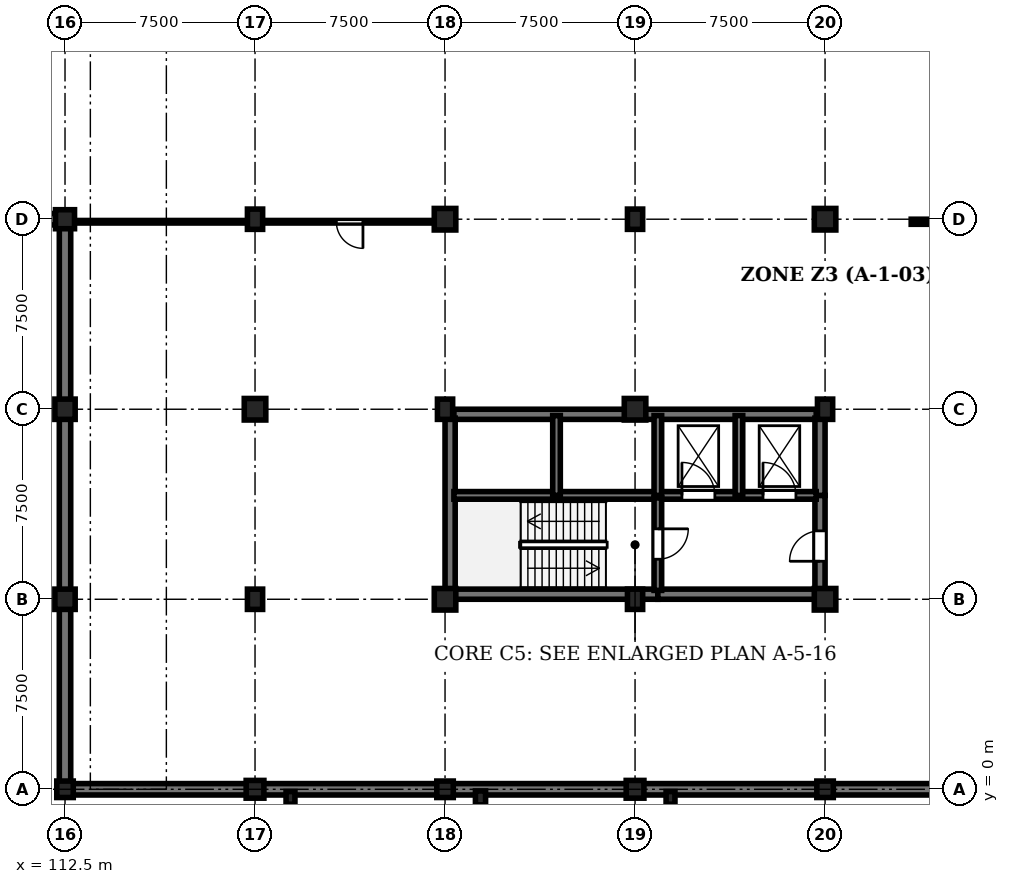
"""IFC4 building model, lengths in metres.
Left out: names, types, materials, properties, quantities, classifications, styles, units other than length and angle.
Written with IfcOpenShell. Run it as: python <this file> out.ifc"""

import sys

from ifc_helpers import new_model, si_unit, direction, frame, frame_2d, origin, origin_2d, place, context, subcontext, project, spatial, rectangle, circle, extrude, element, fill, save


model = new_model("IFC4")
c1 = context("Model", 3, precision=1e-05, world=origin(), true_north=direction((0.0, 1.0)))
c2 = subcontext(c1, "Body", "Model", "MODEL_VIEW")
j1 = project(units=[si_unit("LENGTHUNIT", "METRE"), si_unit("PLANEANGLEUNIT", "RADIAN")], contexts=[c1])
p1 = place(None, origin())
s1 = spatial("IfcSite", under=j1, at=p1, CompositionType="ELEMENT")
p2 = place(p1, origin())
s2 = spatial("IfcBuilding", under=s1, at=p2, CompositionType="ELEMENT")
p3 = place(p2, frame((0.0, 0.0, -4.5)))
s3 = spatial("IfcBuildingStorey", under=s2, at=p3, CompositionType="ELEMENT", Elevation=-4.5)
p4 = place(p3, frame((112.5, 0.0, 0.0), z_axis=(0.0, 0.0, 1.0), x_axis=(1.0, 0.0, 0.0)))
e1 = element("IfcColumn", 1, at=p4, inside=s3, PredefinedType="COLUMN", context=c2, shape_type="SweptSolid", body=[
    extrude(rectangle(XDim=0.65, YDim=0.65, at=origin_2d()), origin(), (0.0, 0.0, 1.0), 4.5),
])
for number, where, z_axis, x_axis in (
    (2, (112.5, 7.5, 0.0), (0.0, 0.0, 1.0), (1.0, 0.0, 0.0)),
    (3, (112.5, 15.0, 0.0), (0.0, 0.0, 1.0), (1.0, 0.0, 0.0)),
):
    element("IfcColumn", number, at=place(p3, frame(where, z_axis=z_axis, x_axis=x_axis)), inside=s3, PredefinedType="COLUMN", context=c2, shape_type="SweptSolid", body=[
        extrude(rectangle(XDim=0.8, YDim=0.8, at=origin_2d()), origin(), (0.0, 0.0, 1.0), 4.5),
    ])
p5 = place(p3, frame((112.5, 22.5, 0.0), z_axis=(0.0, 0.0, 1.0), x_axis=(1.0, 0.0, 0.0)))
e4 = element("IfcColumn", 4, at=p5, inside=s3, PredefinedType="COLUMN", context=c2, shape_type="SweptSolid", body=[
    extrude(circle(Radius=0.375, at=origin_2d()), origin(), (0.0, 0.0, 1.0), 4.5),
])
p6 = place(p3, frame((120.0, 0.0, 0.0), z_axis=(0.0, 0.0, 1.0), x_axis=(1.0, 0.0, 0.0)))
e5 = element("IfcColumn", 5, at=p6, inside=s3, PredefinedType="COLUMN", context=c2, shape_type="SweptSolid", body=[
    extrude(rectangle(XDim=0.7, YDim=0.7, at=origin_2d()), origin(), (0.0, 0.0, 1.0), 4.5),
])
p7 = place(p3, frame((120.0, 7.5, 0.0), z_axis=(0.0, 0.0, 1.0), x_axis=(1.0, 0.0, 0.0)))
e6 = element("IfcColumn", 6, at=p7, inside=s3, PredefinedType="COLUMN", context=c2, shape_type="SweptSolid", body=[
    extrude(rectangle(XDim=0.6, YDim=0.8, at=origin_2d()), origin(), (0.0, 0.0, 1.0), 4.5),
])
p8 = place(p3, frame((120.0, 15.0, 0.0), z_axis=(0.0, 0.0, 1.0), x_axis=(1.0, 0.0, 0.0)))
e7 = element("IfcColumn", 7, at=p8, inside=s3, PredefinedType="COLUMN", context=c2, shape_type="SweptSolid", body=[
    extrude(rectangle(XDim=0.85, YDim=0.85, at=origin_2d()), origin(), (0.0, 0.0, 1.0), 4.5),
])
p9 = place(p3, frame((120.0, 22.5, 0.0), z_axis=(0.0, 0.0, 1.0), x_axis=(1.0, 0.0, 0.0)))
e8 = element("IfcColumn", 8, at=p9, inside=s3, PredefinedType="COLUMN", context=c2, shape_type="SweptSolid", body=[
    extrude(rectangle(XDim=0.6, YDim=0.8, at=origin_2d()), origin(), (0.0, 0.0, 1.0), 4.5),
])
p10 = place(p3, frame((127.5, 0.0, 0.0), z_axis=(0.0, 0.0, 1.0), x_axis=(1.0, 0.0, 0.0)))
e9 = element("IfcColumn", 9, at=p10, inside=s3, PredefinedType="COLUMN", context=c2, shape_type="SweptSolid", body=[
    extrude(rectangle(XDim=0.65, YDim=0.65, at=origin_2d()), origin(), (0.0, 0.0, 1.0), 4.5),
])
p11 = place(p3, frame((127.5, 7.5, 0.0), z_axis=(0.0, 0.0, 1.0), x_axis=(1.0, 0.0, 0.0)))
e10 = element("IfcColumn", 10, at=p11, inside=s3, PredefinedType="COLUMN", context=c2, shape_type="SweptSolid", body=[
    extrude(rectangle(XDim=0.85, YDim=0.85, at=origin_2d()), origin(), (0.0, 0.0, 1.0), 4.5),
])
p12 = place(p3, frame((127.5, 15.0, 0.0), z_axis=(0.0, 0.0, 1.0), x_axis=(1.0, 0.0, 0.0)))
e11 = element("IfcColumn", 11, at=p12, inside=s3, PredefinedType="COLUMN", context=c2, shape_type="SweptSolid", body=[
    extrude(rectangle(XDim=0.6, YDim=0.8, at=origin_2d()), origin(), (0.0, 0.0, 1.0), 4.5),
])
p13 = place(p3, frame((127.5, 22.5, 0.0), z_axis=(0.0, 0.0, 1.0), x_axis=(1.0, 0.0, 0.0)))
e12 = element("IfcColumn", 12, at=p13, inside=s3, PredefinedType="COLUMN", context=c2, shape_type="SweptSolid", body=[
    extrude(rectangle(XDim=0.85, YDim=0.85, at=origin_2d()), origin(), (0.0, 0.0, 1.0), 4.5),
])
p14 = place(p3, frame((135.0, 0.0, 0.0), z_axis=(0.0, 0.0, 1.0), x_axis=(1.0, 0.0, 0.0)))
e13 = element("IfcColumn", 13, at=p14, inside=s3, PredefinedType="COLUMN", context=c2, shape_type="SweptSolid", body=[
    extrude(rectangle(XDim=0.7, YDim=0.7, at=origin_2d()), origin(), (0.0, 0.0, 1.0), 4.5),
])
p15 = place(p3, frame((135.0, 7.5, 0.0), z_axis=(0.0, 0.0, 1.0), x_axis=(1.0, 0.0, 0.0)))
e14 = element("IfcColumn", 14, at=p15, inside=s3, PredefinedType="COLUMN", context=c2, shape_type="SweptSolid", body=[
    extrude(rectangle(XDim=0.6, YDim=0.8, at=origin_2d()), origin(), (0.0, 0.0, 1.0), 4.5),
])
p16 = place(p3, frame((135.0, 15.0, 0.0), z_axis=(0.0, 0.0, 1.0), x_axis=(1.0, 0.0, 0.0)))
e15 = element("IfcColumn", 15, at=p16, inside=s3, PredefinedType="COLUMN", context=c2, shape_type="SweptSolid", body=[
    extrude(rectangle(XDim=0.85, YDim=0.85, at=origin_2d()), origin(), (0.0, 0.0, 1.0), 4.5),
])
p17 = place(p3, frame((135.0, 22.5, 0.0), z_axis=(0.0, 0.0, 1.0), x_axis=(1.0, 0.0, 0.0)))
e16 = element("IfcColumn", 16, at=p17, inside=s3, PredefinedType="COLUMN", context=c2, shape_type="SweptSolid", body=[
    extrude(rectangle(XDim=0.6, YDim=0.8, at=origin_2d()), origin(), (0.0, 0.0, 1.0), 4.5),
])
p18 = place(p3, frame((142.5, 0.0, 0.0), z_axis=(0.0, 0.0, 1.0), x_axis=(1.0, 0.0, 0.0)))
e17 = element("IfcColumn", 17, at=p18, inside=s3, PredefinedType="COLUMN", context=c2, shape_type="SweptSolid", body=[
    extrude(rectangle(XDim=0.65, YDim=0.65, at=origin_2d()), origin(), (0.0, 0.0, 1.0), 4.5),
])
p19 = place(p3, frame((142.5, 7.5, 0.0), z_axis=(0.0, 0.0, 1.0), x_axis=(1.0, 0.0, 0.0)))
e18 = element("IfcColumn", 18, at=p19, inside=s3, PredefinedType="COLUMN", context=c2, shape_type="SweptSolid", body=[
    extrude(rectangle(XDim=0.85, YDim=0.85, at=origin_2d()), origin(), (0.0, 0.0, 1.0), 4.5),
])
p20 = place(p3, frame((142.5, 15.0, 0.0), z_axis=(0.0, 0.0, 1.0), x_axis=(1.0, 0.0, 0.0)))
e19 = element("IfcColumn", 19, at=p20, inside=s3, PredefinedType="COLUMN", context=c2, shape_type="SweptSolid", body=[
    extrude(rectangle(XDim=0.6, YDim=0.8, at=origin_2d()), origin(), (0.0, 0.0, 1.0), 4.5),
])
p21 = place(p3, frame((142.5, 22.5, 0.0), z_axis=(0.0, 0.0, 1.0), x_axis=(1.0, 0.0, 0.0)))
e20 = element("IfcColumn", 20, at=p21, inside=s3, PredefinedType="COLUMN", context=c2, shape_type="SweptSolid", body=[
    extrude(rectangle(XDim=0.85, YDim=0.85, at=origin_2d()), origin(), (0.0, 0.0, 1.0), 4.5),
])
p22 = place(p3, frame((121.4, -0.34, 0.0), z_axis=(0.0, 0.0, 1.0), x_axis=(1.0, 0.0, 0.0)))
e21 = element("IfcColumn", 21, at=p22, inside=s3, PredefinedType="PILASTER", context=c2, shape_type="SweptSolid", body=[
    extrude(rectangle(XDim=0.35, YDim=0.5, at=origin_2d()), origin(), (0.0, 0.0, 1.0), 4.5),
])
p23 = place(p3, frame((128.9, -0.34, 0.0), z_axis=(0.0, 0.0, 1.0), x_axis=(1.0, 0.0, 0.0)))
e22 = element("IfcColumn", 22, at=p23, inside=s3, PredefinedType="PILASTER", context=c2, shape_type="SweptSolid", body=[
    extrude(rectangle(XDim=0.4, YDim=0.55, at=origin_2d()), origin(), (0.0, 0.0, 1.0), 4.5),
])
p24 = place(p3, frame((136.4, -0.34, 0.0), z_axis=(0.0, 0.0, 1.0), x_axis=(1.0, 0.0, 0.0)))
e23 = element("IfcColumn", 23, at=p24, inside=s3, PredefinedType="PILASTER", context=c2, shape_type="SweptSolid", body=[
    extrude(rectangle(XDim=0.35, YDim=0.5, at=origin_2d()), origin(), (0.0, 0.0, 1.0), 4.5),
])
for number, where, z_axis, x_axis in (
    (24, (150.0, 0.0, 0.0), (0.0, 0.0, 1.0), (-1.0, 0.0, 0.0)),
    (25, (142.5, 0.0, 0.0), (0.0, 0.0, 1.0), (-1.0, 0.0, 0.0)),
    (26, (135.0, 0.0, 0.0), (0.0, 0.0, 1.0), (-1.0, 0.0, 0.0)),
    (27, (127.5, 0.0, 0.0), (0.0, 0.0, 1.0), (-1.0, 0.0, 0.0)),
    (28, (120.0, 0.0, 0.0), (0.0, 0.0, 1.0), (-1.0, 0.0, 0.0)),
    (29, (112.5, 0.0, 0.0), (0.0, 0.0, 1.0), (0.0, 1.0, 0.0)),
    (30, (112.5, 7.5, 0.0), (0.0, 0.0, 1.0), (0.0, 1.0, 0.0)),
    (31, (112.5, 15.0, 0.0), (0.0, 0.0, 1.0), (0.0, 1.0, 0.0)),
    (32, (112.5, 22.5, 0.0), (0.0, 0.0, 1.0), (-1.0, 0.0, 0.0)),
):
    element("IfcWall", number, at=place(p3, frame(where, z_axis=z_axis, x_axis=x_axis)), inside=s3, PredefinedType="SOLIDWALL", context=c2, shape_type="SweptSolid", body=[
        extrude(rectangle(XDim=7.5, YDim=0.45, at=frame_2d((3.75, 0.0))), origin(), (0.0, 0.0, 1.0), 4.14),
    ])
p25 = place(p3, frame((127.85, 7.7, 0.0), z_axis=(0.0, 0.0, 1.0), x_axis=(1.0, 0.0, 0.0)))
e33 = element("IfcWall", 33, at=p25, inside=s3, PredefinedType="SHEAR", context=c2, shape_type="SweptSolid", body=[
    extrude(rectangle(XDim=8.05, YDim=0.4, at=frame_2d((4.025, 0.0))), origin(), (0.0, 0.0, 1.0), 4.14),
])
p26 = place(p3, frame((135.9, 7.7, 0.0), z_axis=(0.0, 0.0, 1.0), x_axis=(1.0, 0.0, 0.0)))
e34 = element("IfcWall", 34, at=p26, inside=s3, PredefinedType="SHEAR", context=c2, shape_type="SweptSolid", body=[
    extrude(rectangle(XDim=6.25, YDim=0.4, at=frame_2d((3.125, 0.0))), origin(), (0.0, 0.0, 1.0), 4.14),
])
p27 = place(p3, frame((127.85, 14.8, 0.0), z_axis=(0.0, 0.0, 1.0), x_axis=(1.0, 0.0, 0.0)))
e35 = element("IfcWall", 35, at=p27, inside=s3, PredefinedType="SHEAR", context=c2, shape_type="SweptSolid", body=[
    extrude(rectangle(XDim=14.3, YDim=0.4, at=frame_2d((7.15, 0.0))), origin(), (0.0, 0.0, 1.0), 4.14),
])
p28 = place(p3, frame((127.7, 7.85, 0.0), z_axis=(0.0, 0.0, 1.0), x_axis=(0.0, 1.0, 0.0)))
e36 = element("IfcWall", 36, at=p28, inside=s3, PredefinedType="SHEAR", context=c2, shape_type="SweptSolid", body=[
    extrude(rectangle(XDim=6.8, YDim=0.4, at=frame_2d((3.4, 0.0))), origin(), (0.0, 0.0, 1.0), 4.14),
])
p29 = place(p3, frame((142.3, 7.85, 0.0), z_axis=(0.0, 0.0, 1.0), x_axis=(0.0, 1.0, 0.0)))
e37 = element("IfcWall", 37, at=p29, inside=s3, PredefinedType="SHEAR", context=c2, shape_type="SweptSolid", body=[
    extrude(rectangle(XDim=3.75, YDim=0.4, at=frame_2d((1.875, 0.0))), origin(), (0.0, 0.0, 1.0), 4.14),
])
p30 = place(p29, frame((1.15, 0.0, 0.0)))
e38 = element("IfcOpeningElement", 38, at=p30, cuts=e37, PredefinedType="OPENING", context=c2, shape_type="SweptSolid", body=[
    extrude(rectangle(XDim=1.2, YDim=2.25, at=frame_2d((0.6, 1.125))), frame((0.0, 0.21, 0.0), z_axis=(0.0, -1.0, 0.0), x_axis=(1.0, 0.0, 0.0)), (0.0, 0.0, 1.0), 0.42),
])
p31 = place(p3, frame((142.3, 11.6, 0.0), z_axis=(0.0, 0.0, 1.0), x_axis=(0.0, 1.0, 0.0)))
e39 = element("IfcWall", 39, at=p31, inside=s3, PredefinedType="SHEAR", context=c2, shape_type="SweptSolid", body=[
    extrude(rectangle(XDim=3.05, YDim=0.4, at=frame_2d((1.525, 0.0))), origin(), (0.0, 0.0, 1.0), 4.14),
])
p32 = place(p3, frame((127.85, 11.6, 0.0), z_axis=(0.0, 0.0, 1.0), x_axis=(1.0, 0.0, 0.0)))
e40 = element("IfcWall", 40, at=p32, inside=s3, PredefinedType="SHEAR", context=c2, shape_type="SweptSolid", body=[
    extrude(rectangle(XDim=8.05, YDim=0.3, at=frame_2d((4.025, 0.0))), origin(), (0.0, 0.0, 1.0), 4.14),
])
p33 = place(p3, frame((135.9, 11.6, 0.0), z_axis=(0.0, 0.0, 1.0), x_axis=(1.0, 0.0, 0.0)))
e41 = element("IfcWall", 41, at=p33, inside=s3, PredefinedType="SHEAR", context=c2, shape_type="SweptSolid", body=[
    extrude(rectangle(XDim=6.25, YDim=0.3, at=frame_2d((3.125, 0.0))), origin(), (0.0, 0.0, 1.0), 4.14),
])
p34 = place(p33, frame((0.95, 0.0, 0.0)))
e42 = element("IfcOpeningElement", 42, at=p34, cuts=e41, PredefinedType="OPENING", context=c2, shape_type="SweptSolid", body=[
    extrude(rectangle(XDim=1.3, YDim=2.2, at=frame_2d((0.65, 1.1))), frame((0.0, 0.16, 0.0), z_axis=(0.0, -1.0, 0.0), x_axis=(1.0, 0.0, 0.0)), (0.0, 0.0, 1.0), 0.32),
])
p35 = place(p33, frame((4.15, 0.0, 0.0)))
e43 = element("IfcOpeningElement", 43, at=p35, cuts=e41, PredefinedType="OPENING", context=c2, shape_type="SweptSolid", body=[
    extrude(rectangle(XDim=1.3, YDim=2.2, at=frame_2d((0.65, 1.1))), frame((0.0, 0.16, 0.0), z_axis=(0.0, -1.0, 0.0), x_axis=(1.0, 0.0, 0.0)), (0.0, 0.0, 1.0), 0.32),
])
p36 = place(p3, frame((135.9, 11.5, 0.0), z_axis=(0.0, 0.0, 1.0), x_axis=(0.0, -1.0, 0.0)))
e44 = element("IfcWall", 44, at=p36, inside=s3, PredefinedType="SHEAR", context=c2, shape_type="SweptSolid", body=[
    extrude(rectangle(XDim=3.65, YDim=0.3, at=frame_2d((1.825, 0.0))), origin(), (0.0, 0.0, 1.0), 4.14),
])
p37 = place(p36, frame((1.22, 0.0, 0.0)))
e45 = element("IfcOpeningElement", 45, at=p37, cuts=e44, PredefinedType="OPENING", context=c2, shape_type="SweptSolid", body=[
    extrude(rectangle(XDim=1.2, YDim=2.25, at=frame_2d((0.6, 1.125))), frame((0.0, 0.16, 0.0), z_axis=(0.0, -1.0, 0.0), x_axis=(1.0, 0.0, 0.0)), (0.0, 0.0, 1.0), 0.32),
])
for number, where, z_axis, x_axis in (
    (46, (131.9, 11.6, 0.0), (0.0, 0.0, 1.0), (0.0, 1.0, 0.0)),
    (47, (135.9, 11.6, 0.0), (0.0, 0.0, 1.0), (0.0, 1.0, 0.0)),
    (48, (139.1, 11.6, 0.0), (0.0, 0.0, 1.0), (0.0, 1.0, 0.0)),
):
    element("IfcWall", number, at=place(p3, frame(where, z_axis=z_axis, x_axis=x_axis)), inside=s3, PredefinedType="SHEAR", context=c2, shape_type="SweptSolid", body=[
        extrude(rectangle(XDim=3.15, YDim=0.3, at=frame_2d((1.575, 0.0))), origin(), (0.0, 0.0, 1.0), 4.14),
    ])
p38 = place(p3, frame((127.0, 22.4, 0.0), z_axis=(0.0, 0.0, 1.0), x_axis=(-1.0, 0.0, 0.0)))
e49 = element("IfcWall", 49, at=p38, inside=s3, PredefinedType="PARTITIONING", context=c2, shape_type="SweptSolid", body=[
    extrude(rectangle(XDim=14.0, YDim=0.1, at=frame_2d((7.0, 0.0))), origin(), (0.0, 0.0, 1.0), 3.475),
])
p39 = place(p38, frame((2.74, 0.0, 0.0)))
e50 = element("IfcOpeningElement", 50, at=p39, cuts=e49, PredefinedType="OPENING", context=c2, shape_type="SweptSolid", body=[
    extrude(rectangle(XDim=1.05, YDim=2.2, at=frame_2d((0.525, 1.1))), frame((0.0, 0.06, 0.0), z_axis=(0.0, -1.0, 0.0), x_axis=(1.0, 0.0, 0.0)), (0.0, 0.0, 1.0), 0.12),
])
p40 = place(p3, frame((172.0, 22.4, 0.0), z_axis=(0.0, 0.0, 1.0), x_axis=(-1.0, 0.0, 0.0)))
e51 = element("IfcWall", 51, at=p40, inside=s3, PredefinedType="STANDARD", context=c2, shape_type="SweptSolid", body=[
    extrude(rectangle(XDim=26.1, YDim=0.2, at=frame_2d((13.05, 0.0))), origin(), (0.0, 0.0, 1.0), 3.475),
])
p41 = place(p40, frame((2.705, 0.0, 0.0)))
e52 = element("IfcOpeningElement", 52, at=p41, cuts=e51, PredefinedType="OPENING", context=c2, shape_type="SweptSolid", body=[
    extrude(rectangle(XDim=1.05, YDim=2.2, at=frame_2d((0.525, 1.1))), frame((0.0, 0.11, 0.0), z_axis=(0.0, -1.0, 0.0), x_axis=(1.0, 0.0, 0.0)), (0.0, 0.0, 1.0), 0.22),
])
p42 = place(p30, origin())
e53 = element("IfcDoor", 53, at=p42, inside=s3, OperationType="SINGLE_SWING_LEFT", PredefinedType="DOOR", context=c2, shape_type="SweptSolid", body=[
    extrude(rectangle(XDim=1.2, YDim=2.25, at=frame_2d((0.6, 1.125))), frame((0.0, 0.025, 0.0), z_axis=(0.0, -1.0, 0.0), x_axis=(1.0, 0.0, 0.0)), (0.0, 0.0, 1.0), 0.05),
])
fill(e38, e53)
p43 = place(p34, origin())
e54 = element("IfcDoor", 54, at=p43, inside=s3, OperationType="DOUBLE_DOOR_SLIDING", PredefinedType="DOOR", context=c2, shape_type="SweptSolid", body=[
    extrude(rectangle(XDim=1.3, YDim=2.2, at=frame_2d((0.65, 1.1))), frame((0.0, 0.025, 0.0), z_axis=(0.0, -1.0, 0.0), x_axis=(1.0, 0.0, 0.0)), (0.0, 0.0, 1.0), 0.05),
])
fill(e42, e54)
p44 = place(p35, origin())
e55 = element("IfcDoor", 55, at=p44, inside=s3, OperationType="DOUBLE_DOOR_SLIDING", PredefinedType="DOOR", context=c2, shape_type="SweptSolid", body=[
    extrude(rectangle(XDim=1.3, YDim=2.2, at=frame_2d((0.65, 1.1))), frame((0.0, 0.025, 0.0), z_axis=(0.0, -1.0, 0.0), x_axis=(1.0, 0.0, 0.0)), (0.0, 0.0, 1.0), 0.05),
])
fill(e43, e55)
p45 = place(p37, origin())
e56 = element("IfcDoor", 56, at=p45, inside=s3, OperationType="SINGLE_SWING_LEFT", PredefinedType="DOOR", context=c2, shape_type="SweptSolid", body=[
    extrude(rectangle(XDim=1.2, YDim=2.25, at=frame_2d((0.6, 1.125))), frame((0.0, 0.025, 0.0), z_axis=(0.0, -1.0, 0.0), x_axis=(1.0, 0.0, 0.0)), (0.0, 0.0, 1.0), 0.05),
])
fill(e45, e56)
p46 = place(p39, origin())
e57 = element("IfcDoor", 57, at=p46, inside=s3, OperationType="SINGLE_SWING_LEFT", PredefinedType="DOOR", context=c2, shape_type="SweptSolid", body=[
    extrude(rectangle(XDim=1.05, YDim=2.2, at=frame_2d((0.525, 1.1))), frame((0.0, 0.025, 0.0), z_axis=(0.0, -1.0, 0.0), x_axis=(1.0, 0.0, 0.0)), (0.0, 0.0, 1.0), 0.05),
])
fill(e50, e57)
save(model, sys.argv[1])
